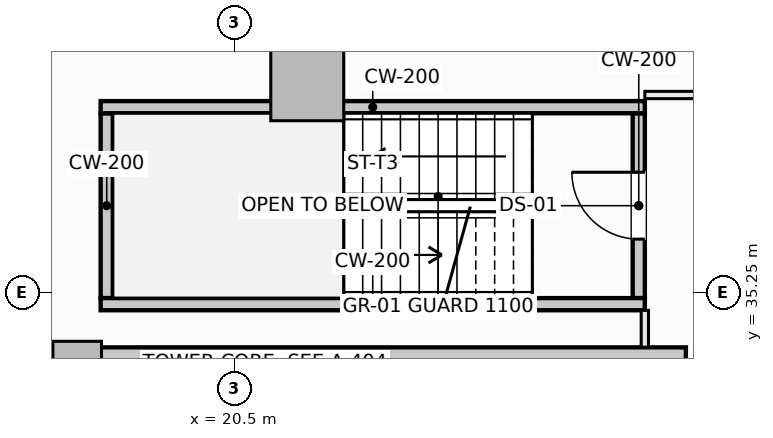
"""IFC4 building model, lengths in metres.
Left out: names, types, materials, properties, quantities, classifications, styles, units other than length and angle.
Written with IfcOpenShell. Run it as: python <this file> out.ifc"""

import sys

from ifc_helpers import new_model, si_unit, direction, frame, frame_2d, origin, origin_2d, place, context, subcontext, project, spatial, rectangle, extrude, element, fill, save


model = new_model("IFC4")
c1 = context("Model", 3, precision=1e-05, world=origin(), true_north=direction((0.0, 1.0)))
c2 = subcontext(c1, "Body", "Model", "MODEL_VIEW")
j1 = project(units=[si_unit("LENGTHUNIT", "METRE"), si_unit("PLANEANGLEUNIT", "RADIAN")], contexts=[c1])
p1 = place(None, origin())
s1 = spatial("IfcSite", under=j1, at=p1, CompositionType="ELEMENT")
p2 = place(p1, origin())
s2 = spatial("IfcBuilding", under=s1, at=p2, CompositionType="ELEMENT")
p3 = place(p2, frame((0.0, 0.0, 30.35)))
s3 = spatial("IfcBuildingStorey", under=s2, at=p3, CompositionType="ELEMENT", Elevation=30.35)
p4 = place(p3, frame((14.075, 33.925, -0.28), z_axis=(0.0, 0.0, 1.0), x_axis=(1.0, 0.0, 0.0)))
e1 = element("IfcWall", 1, at=p4, inside=s3, PredefinedType="SHEAR", context=c2, shape_type="SweptSolid", body=[
    extrude(rectangle(XDim=13.85, YDim=0.85, at=frame_2d((6.925, 0.0))), origin(), (0.0, 0.0, 1.0), 3.85),
])
p5 = place(p3, frame((21.698, 38.677, -0.28), z_axis=(0.0, 0.0, 1.0), x_axis=(1.0, 0.0, 0.0)))
e2 = element("IfcColumn", 2, at=p5, inside=s3, PredefinedType="COLUMN", context=c2, shape_type="SweptSolid", body=[
    extrude(rectangle(XDim=1.2, YDim=1.2, at=origin_2d()), origin(), (0.0, 0.0, 1.0), 3.85),
])
p6 = place(p3, frame((17.914, 34.05, -0.28), z_axis=(0.0, 0.0, 1.0), x_axis=(1.0, 0.0, 0.0)))
e3 = element("IfcColumn", 3, at=p6, inside=s3, PredefinedType="PILASTER", context=c2, shape_type="SweptSolid", body=[
    extrude(rectangle(XDim=0.8, YDim=0.8, at=origin_2d()), origin(), (0.0, 0.0, 1.0), 3.85),
])
p7 = place(p3, frame((27.15, 35.16, -0.28), z_axis=(0.0, 0.0, 1.0), x_axis=(0.0, 1.0, 0.0)))
e4 = element("IfcWall", 4, at=p7, inside=s3, PredefinedType="SHEAR", context=c2, shape_type="SweptSolid", body=[
    extrude(rectangle(XDim=3.04, YDim=0.2, at=frame_2d((1.52, 0.0))), origin(), (0.0, 0.0, 1.0), 3.85),
])
p8 = place(p7, frame((0.97, 0.0, 0.28)))
e5 = element("IfcOpeningElement", 5, at=p8, cuts=e4, PredefinedType="OPENING", context=c2, shape_type="SweptSolid", body=[
    extrude(rectangle(XDim=1.1, YDim=2.15, at=frame_2d((0.55, 1.075))), frame((0.0, 0.11, 0.0), z_axis=(0.0, -1.0, 0.0), x_axis=(1.0, 0.0, 0.0)), (0.0, 0.0, 1.0), 0.22),
])
p9 = place(p3, frame((18.4, 35.16, -0.28), z_axis=(0.0, 0.0, 1.0), x_axis=(0.0, 1.0, 0.0)))
e6 = element("IfcWall", 6, at=p9, inside=s3, PredefinedType="SHEAR", context=c2, shape_type="SweptSolid", body=[
    extrude(rectangle(XDim=3.04, YDim=0.2, at=frame_2d((1.52, 0.0))), origin(), (0.0, 0.0, 1.0), 3.85),
])
for number, where, z_axis, x_axis in (
    (7, (18.3, 38.3, -0.28), (0.0, 0.0, 1.0), (1.0, 0.0, 0.0)),
    (8, (18.3, 35.06, -0.28), (0.0, 0.0, 1.0), (1.0, 0.0, 0.0)),
):
    element("IfcWall", number, at=place(p3, frame(where, z_axis=z_axis, x_axis=x_axis)), inside=s3, PredefinedType="SHEAR", context=c2, shape_type="SweptSolid", body=[
        extrude(rectangle(XDim=8.95, YDim=0.2, at=frame_2d((4.475, 0.0))), origin(), (0.0, 0.0, 1.0), 3.85),
    ])
p10 = place(p3, frame((27.25, 34.352, 0.0), z_axis=(0.0, 0.0, 1.0), x_axis=(0.0, 1.0, 0.0)))
e9 = element("IfcWall", 9, at=p10, inside=s3, PredefinedType="PARTITIONING", context=c2, shape_type="SweptSolid", body=[
    extrude(rectangle(XDim=0.606, YDim=0.12, at=frame_2d((0.303, 0.0))), origin(), (0.0, 0.0, 1.0), 3.57),
])
p11 = place(p3, frame((27.25, 38.5, 0.0), z_axis=(0.0, 0.0, 1.0), x_axis=(1.0, 0.0, 0.0)))
e10 = element("IfcWall", 10, at=p11, inside=s3, PredefinedType="PARTITIONING", context=c2, shape_type="SweptSolid", body=[
    extrude(rectangle(XDim=2.53, YDim=0.12, at=frame_2d((1.265, 0.0))), origin(), (0.0, 0.0, 1.0), 3.57),
])
p12 = place(p8, origin())
e11 = element("IfcDoor", 11, at=p12, inside=s3, OperationType="SINGLE_SWING_RIGHT", PredefinedType="DOOR", context=c2, shape_type="SweptSolid", body=[
    extrude(rectangle(XDim=1.1, YDim=2.15, at=frame_2d((0.55, 1.075))), frame((0.0, 0.025, 0.0), z_axis=(0.0, -1.0, 0.0), x_axis=(1.0, 0.0, 0.0)), (0.0, 0.0, 1.0), 0.05),
])
fill(e5, e11)
save(model, sys.argv[1])
